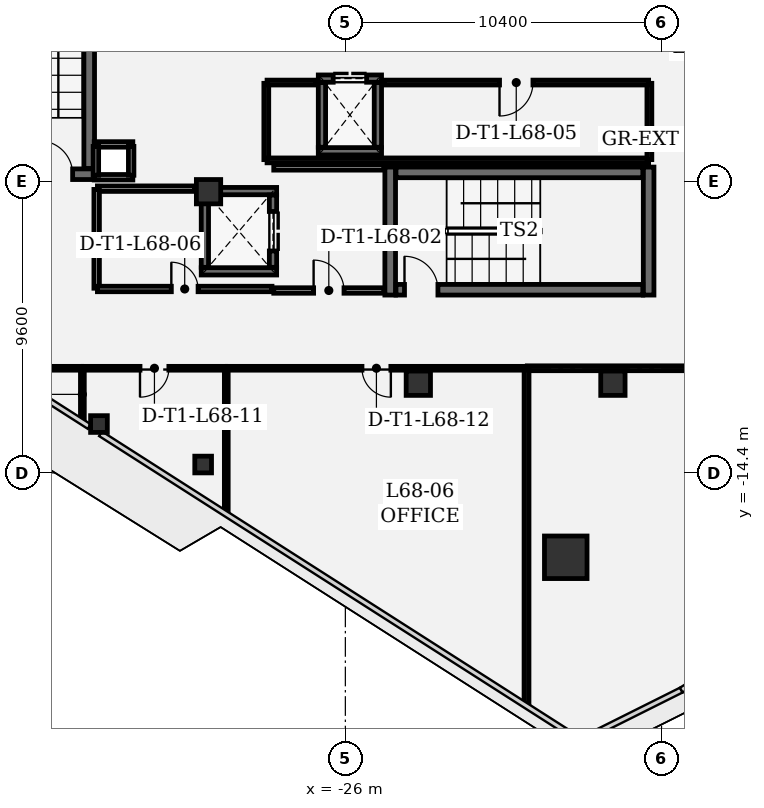
"""IFC4 building model, lengths in metres.
Left out: names, types, materials, properties, quantities, classifications, styles, units other than length and angle.
Written with IfcOpenShell. Run it as: python <this file> out.ifc"""

import sys

from ifc_helpers import new_model, si_unit, direction, frame, frame_2d, origin, origin_2d, place, context, subcontext, project, spatial, rectangle, extrude, element, fill, save


model = new_model("IFC4")
c1 = context("Model", 3, precision=1e-05, world=origin(), true_north=direction((0.0, 1.0)))
c2 = subcontext(c1, "Body", "Model", "MODEL_VIEW")
j1 = project(units=[si_unit("LENGTHUNIT", "METRE"), si_unit("PLANEANGLEUNIT", "RADIAN")], contexts=[c1])
p1 = place(None, origin())
s1 = spatial("IfcSite", under=j1, at=p1, CompositionType="ELEMENT")
p2 = place(p1, origin())
s2 = spatial("IfcBuilding", under=s1, at=p2, CompositionType="ELEMENT")
p3 = place(p2, frame((0.0, 0.0, 293.4)))
s3 = spatial("IfcBuildingStorey", under=s2, at=p3, CompositionType="ELEMENT", Elevation=293.4)
p4 = place(p3, frame((-18.75, -17.176, 0.0), z_axis=(0.0, 0.0, 1.0), x_axis=(1.0, 0.0, 0.0)))
e1 = element("IfcColumn", 1, at=p4, inside=s3, PredefinedType="COLUMN", context=c2, shape_type="SweptSolid", body=[
    extrude(rectangle(XDim=1.4, YDim=1.4, at=origin_2d()), origin(), (0.0, 0.0, 1.0), 4.2),
])
for number, where, z_axis, x_axis in (
    (2, (-17.2, -11.45, 0.0), (0.0, 0.0, 1.0), (1.0, 0.0, 0.0)),
    (3, (-23.6, -11.45, 0.0), (0.0, 0.0, 1.0), (1.0, 0.0, 0.0)),
    (4, (-30.5, -5.15, 0.0), (0.0, 0.0, 1.0), (1.0, 0.0, 0.0)),
):
    element("IfcColumn", number, at=place(p3, frame(where, z_axis=z_axis, x_axis=x_axis)), inside=s3, PredefinedType="COLUMN", context=c2, shape_type="SweptSolid", body=[
        extrude(rectangle(XDim=0.8, YDim=0.8, at=origin_2d()), origin(), (0.0, 0.0, 1.0), 4.2),
    ])
for number, where, z_axis, x_axis in (
    (5, (-34.104, -12.792, 0.0), (0.0, 0.0, 1.0), (1.0, 0.0, 0.0)),
    (6, (-30.677, -14.124, 0.0), (0.0, 0.0, 1.0), (1.0, 0.0, 0.0)),
):
    element("IfcColumn", number, at=place(p3, frame(where, z_axis=z_axis, x_axis=x_axis)), inside=s3, PredefinedType="COLUMN", context=c2, shape_type="SweptSolid", body=[
        extrude(rectangle(XDim=0.55, YDim=0.55, at=origin_2d()), origin(), (0.0, 0.0, 1.0), 4.2),
    ])
for number, where, z_axis, x_axis in (
    (7, (-24.525, -4.34, 0.0), (0.0, 0.0, 1.0), (0.0, -1.0, 0.0)),
    (8, (-16.025, -8.55, 0.0), (0.0, 0.0, 1.0), (0.0, 1.0, 0.0)),
):
    element("IfcWall", number, at=place(p3, frame(where, z_axis=z_axis, x_axis=x_axis)), inside=s3, PredefinedType="SHEAR", context=c2, shape_type="SweptSolid", body=[
        extrude(rectangle(XDim=4.21, YDim=0.35, at=frame_2d((2.105, 0.0))), origin(), (0.0, 0.0, 1.0), 3.91),
    ])
p5 = place(p3, frame((-24.335, -8.375, 0.0), z_axis=(0.0, 0.0, 1.0), x_axis=(1.0, 0.0, 0.0)))
e9 = element("IfcWall", 9, at=p5, inside=s3, PredefinedType="SHEAR", context=c2, shape_type="SweptSolid", body=[
    extrude(rectangle(XDim=8.12, YDim=0.35, at=frame_2d((4.06, 0.0))), origin(), (0.0, 0.0, 1.0), 3.91),
])
p6 = place(p5, frame((0.28, 0.0, 0.0)))
e10 = element("IfcOpeningElement", 10, at=p6, cuts=e9, PredefinedType="OPENING", context=c2, shape_type="SweptSolid", body=[
    extrude(rectangle(XDim=1.1, YDim=2.2, at=frame_2d((0.55, 1.1))), frame((0.0, 0.185, 0.0), z_axis=(0.0, -1.0, 0.0), x_axis=(1.0, 0.0, 0.0)), (0.0, 0.0, 1.0), 0.37),
])
p7 = place(p3, frame((-16.215, -4.515, 0.0), z_axis=(0.0, 0.0, 1.0), x_axis=(-1.0, 0.0, 0.0)))
e11 = element("IfcWall", 11, at=p7, inside=s3, PredefinedType="SHEAR", context=c2, shape_type="SweptSolid", body=[
    extrude(rectangle(XDim=8.12, YDim=0.35, at=frame_2d((4.06, 0.0))), origin(), (0.0, 0.0, 1.0), 3.91),
])
p8 = place(p3, frame((-38.46, -4.575, 0.0), z_axis=(0.0, 0.0, 1.0), x_axis=(1.0, 0.0, 0.0)))
e12 = element("IfcWall", 12, at=p8, inside=s3, PredefinedType="SHEAR", context=c2, shape_type="SweptSolid", body=[
    extrude(rectangle(XDim=4.21, YDim=0.35, at=frame_2d((2.105, 0.0))), origin(), (0.0, 0.0, 1.0), 3.91),
])
p9 = place(p8, frame((2.39, 0.0, 0.0)))
e13 = element("IfcOpeningElement", 13, at=p9, cuts=e12, PredefinedType="OPENING", context=c2, shape_type="SweptSolid", body=[
    extrude(rectangle(XDim=1.1, YDim=2.2, at=frame_2d((0.55, 1.1))), frame((0.0, 0.185, 0.0), z_axis=(0.0, -1.0, 0.0), x_axis=(1.0, 0.0, 0.0)), (0.0, 0.0, 1.0), 0.37),
])
p10 = place(p3, frame((-34.425, -4.385, 0.0), z_axis=(0.0, 0.0, 1.0), x_axis=(0.0, 1.0, 0.0)))
e14 = element("IfcWall", 14, at=p10, inside=s3, PredefinedType="SHEAR", context=c2, shape_type="SweptSolid", body=[
    extrude(rectangle(XDim=8.77, YDim=0.35, at=frame_2d((4.385, 0.0))), origin(), (0.0, 0.0, 1.0), 3.91),
])
for number, where, z_axis, x_axis in (
    (15, (-28.26, -7.77, 0.0), (0.0, 0.0, 1.0), (-1.0, 0.0, 0.0)),
    (16, (-30.74, -5.13, 0.0), (0.0, 0.0, 1.0), (1.0, 0.0, 0.0)),
):
    element("IfcWall", number, at=place(p3, frame(where, z_axis=z_axis, x_axis=x_axis)), inside=s3, PredefinedType="SHEAR", context=c2, shape_type="SweptSolid", body=[
        extrude(rectangle(XDim=2.48, YDim=0.24, at=frame_2d((1.24, 0.0))), origin(), (0.0, 0.0, 1.0), 3.91),
    ])
p11 = place(p3, frame((-30.62, -7.638, 0.0), z_axis=(0.0, 0.0, 1.0), x_axis=(0.0, 1.0, 0.0)))
e17 = element("IfcWall", 17, at=p11, inside=s3, PredefinedType="SHEAR", context=c2, shape_type="SweptSolid", body=[
    extrude(rectangle(XDim=2.376, YDim=0.24, at=frame_2d((1.188, 0.0))), origin(), (0.0, 0.0, 1.0), 3.91),
])
p12 = place(p3, frame((-28.38, -5.262, 0.0), z_axis=(0.0, 0.0, 1.0), x_axis=(0.0, -1.0, 0.0)))
e18 = element("IfcWall", 18, at=p12, inside=s3, PredefinedType="SHEAR", context=c2, shape_type="SweptSolid", body=[
    extrude(rectangle(XDim=2.376, YDim=0.24, at=frame_2d((1.188, 0.0))), origin(), (0.0, 0.0, 1.0), 3.91),
])
p13 = place(p12, frame((0.538, 0.0, 0.0)))
e19 = element("IfcOpeningElement", 19, at=p13, cuts=e18, PredefinedType="OPENING", context=c2, shape_type="SweptSolid", body=[
    extrude(rectangle(XDim=1.3, YDim=2.3, at=frame_2d((0.65, 1.15))), frame((0.0, 0.13, 0.0), z_axis=(0.0, -1.0, 0.0), x_axis=(1.0, 0.0, 0.0)), (0.0, 0.0, 1.0), 0.26),
])
p14 = place(p3, frame((-24.81, -3.82, 0.0), z_axis=(0.0, 0.0, 1.0), x_axis=(-1.0, 0.0, 0.0)))
e20 = element("IfcWall", 20, at=p14, inside=s3, PredefinedType="SHEAR", context=c2, shape_type="SweptSolid", body=[
    extrude(rectangle(XDim=2.08, YDim=0.24, at=frame_2d((1.04, 0.0))), origin(), (0.0, 0.0, 1.0), 3.91),
])
p15 = place(p3, frame((-26.89, -1.43, 0.0), z_axis=(0.0, 0.0, 1.0), x_axis=(1.0, 0.0, 0.0)))
e21 = element("IfcWall", 21, at=p15, inside=s3, PredefinedType="SHEAR", context=c2, shape_type="SweptSolid", body=[
    extrude(rectangle(XDim=2.08, YDim=0.24, at=frame_2d((1.04, 0.0))), origin(), (0.0, 0.0, 1.0), 3.91),
])
p16 = place(p15, frame((0.49, 0.0, 0.0)))
e22 = element("IfcOpeningElement", 22, at=p16, cuts=e21, PredefinedType="OPENING", context=c2, shape_type="SweptSolid", body=[
    extrude(rectangle(XDim=1.1, YDim=2.2, at=frame_2d((0.55, 1.1))), frame((0.0, 0.13, 0.0), z_axis=(0.0, -1.0, 0.0), x_axis=(1.0, 0.0, 0.0)), (0.0, 0.0, 1.0), 0.26),
])
for number, where, z_axis, x_axis in (
    (23, (-26.77, -3.688, 0.0), (0.0, 0.0, 1.0), (0.0, 1.0, 0.0)),
    (24, (-24.93, -1.562, 0.0), (0.0, 0.0, 1.0), (0.0, -1.0, 0.0)),
):
    element("IfcWall", number, at=place(p3, frame(where, z_axis=z_axis, x_axis=x_axis)), inside=s3, PredefinedType="SHEAR", context=c2, shape_type="SweptSolid", body=[
        extrude(rectangle(XDim=2.126, YDim=0.24, at=frame_2d((1.063, 0.0))), origin(), (0.0, 0.0, 1.0), 3.91),
    ])
for number, where, z_axis, x_axis in (
    (25, (-32.99, -4.675, 0.0), (0.0, 0.0, 1.0), (-1.0, 0.0, 0.0)),
    (26, (-34.26, -3.595, 0.0), (0.0, 0.0, 1.0), (1.0, 0.0, 0.0)),
):
    element("IfcWall", number, at=place(p3, frame(where, z_axis=z_axis, x_axis=x_axis)), inside=s3, PredefinedType="PARTITIONING", context=c2, shape_type="SweptSolid", body=[
        extrude(rectangle(XDim=1.27, YDim=0.18, at=frame_2d((0.635, 0.0))), origin(), (0.0, 0.0, 1.0), 3.91),
    ])
for number, where, z_axis, x_axis in (
    (27, (-34.205, -4.61, 0.0), (0.0, 0.0, 1.0), (0.0, 1.0, 0.0)),
    (28, (-33.045, -3.66, 0.0), (0.0, 0.0, 1.0), (0.0, -1.0, 0.0)),
):
    element("IfcWall", number, at=place(p3, frame(where, z_axis=z_axis, x_axis=x_axis)), inside=s3, PredefinedType="PARTITIONING", context=c2, shape_type="SweptSolid", body=[
        extrude(rectangle(XDim=0.95, YDim=0.18, at=frame_2d((0.475, 0.0))), origin(), (0.0, 0.0, 1.0), 3.91),
    ])
p17 = place(p3, frame((-28.355, -8.4, 0.0), z_axis=(0.0, 0.0, 1.0), x_axis=(1.0, 0.0, 0.0)))
e29 = element("IfcWall", 29, at=p17, inside=s3, PredefinedType="PARTITIONING", context=c2, shape_type="SweptSolid", body=[
    extrude(rectangle(XDim=3.622, YDim=0.18, at=frame_2d((1.811, 0.0))), origin(), (0.0, 0.0, 1.0), 3.529),
])
p18 = place(p17, frame((1.311, 0.0, 0.0)))
e30 = element("IfcOpeningElement", 30, at=p18, cuts=e29, PredefinedType="OPENING", context=c2, shape_type="SweptSolid", body=[
    extrude(rectangle(XDim=1.0, YDim=2.15, at=frame_2d((0.5, 1.075))), frame((0.0, 0.1, 0.0), z_axis=(0.0, -1.0, 0.0), x_axis=(1.0, 0.0, 0.0)), (0.0, 0.0, 1.0), 0.2),
])
p19 = place(p3, frame((-24.733, -4.35, 0.0), z_axis=(0.0, 0.0, 1.0), x_axis=(-1.0, 0.0, 0.0)))
e31 = element("IfcWall", 31, at=p19, inside=s3, PredefinedType="PARTITIONING", context=c2, shape_type="SweptSolid", body=[
    extrude(rectangle(XDim=3.622, YDim=0.18, at=frame_2d((1.811, 0.0))), origin(), (0.0, 0.0, 1.0), 3.91),
])
p20 = place(p3, frame((-28.6, -1.585, 0.0), z_axis=(0.0, 0.0, 1.0), x_axis=(0.0, -1.0, 0.0)))
e32 = element("IfcWall", 32, at=p20, inside=s3, PredefinedType="PARTITIONING", context=c2, shape_type="SweptSolid", body=[
    extrude(rectangle(XDim=2.51, YDim=0.16, at=frame_2d((1.255, 0.0))), origin(), (0.0, 0.0, 1.0), 3.91),
])
p21 = place(p3, frame((-28.575, -4.12, 0.0), z_axis=(0.0, 0.0, 1.0), x_axis=(1.0, 0.0, 0.0)))
e33 = element("IfcWall", 33, at=p21, inside=s3, PredefinedType="PARTITIONING", context=c2, shape_type="SweptSolid", body=[
    extrude(rectangle(XDim=12.55, YDim=0.16, at=frame_2d((6.275, 0.0))), origin(), (0.0, 0.0, 1.0), 3.91),
])
p22 = place(p3, frame((-16.0, -4.095, 0.0), z_axis=(0.0, 0.0, 1.0), x_axis=(0.0, 1.0, 0.0)))
e34 = element("IfcWall", 34, at=p22, inside=s3, PredefinedType="PARTITIONING", context=c2, shape_type="SweptSolid", body=[
    extrude(rectangle(XDim=2.51, YDim=0.16, at=frame_2d((1.255, 0.0))), origin(), (0.0, 0.0, 1.0), 3.91),
])
p23 = place(p3, frame((-16.025, -1.56, 0.0), z_axis=(0.0, 0.0, 1.0), x_axis=(-1.0, 0.0, 0.0)))
e35 = element("IfcWall", 35, at=p23, inside=s3, PredefinedType="PARTITIONING", context=c2, shape_type="SweptSolid", body=[
    extrude(rectangle(XDim=8.709, YDim=0.16, at=frame_2d((4.354, 0.0))), origin(), (0.0, 0.0, 1.0), 3.91),
])
p24 = place(p23, frame((3.804, 0.0, 0.0)))
e36 = element("IfcOpeningElement", 36, at=p24, cuts=e35, PredefinedType="OPENING", context=c2, shape_type="SweptSolid", body=[
    extrude(rectangle(XDim=1.1, YDim=2.15, at=frame_2d((0.55, 1.075))), frame((0.0, 0.09, 0.0), z_axis=(0.0, -1.0, 0.0), x_axis=(1.0, 0.0, 0.0)), (0.0, 0.0, 1.0), 0.18),
])
p25 = place(p3, frame((-26.966, -1.56, 0.0), z_axis=(0.0, 0.0, 1.0), x_axis=(-1.0, 0.0, 0.0)))
e37 = element("IfcWall", 37, at=p25, inside=s3, PredefinedType="PARTITIONING", context=c2, shape_type="SweptSolid", body=[
    extrude(rectangle(XDim=1.609, YDim=0.16, at=frame_2d((0.805, 0.0))), origin(), (0.0, 0.0, 1.0), 3.91),
])
p26 = place(p3, frame((-30.965, -5.05, 0.0), z_axis=(0.0, 0.0, 1.0), x_axis=(-1.0, 0.0, 0.0)))
e38 = element("IfcWall", 38, at=p26, inside=s3, PredefinedType="PARTITIONING", context=c2, shape_type="SweptSolid", body=[
    extrude(rectangle(XDim=3.19, YDim=0.18, at=frame_2d((1.595, 0.0))), origin(), (0.0, 0.0, 1.0), 3.91),
])
p27 = place(p3, frame((-34.18, -5.075, 0.0), z_axis=(0.0, 0.0, 1.0), x_axis=(0.0, -1.0, 0.0)))
e39 = element("IfcWall", 39, at=p27, inside=s3, PredefinedType="PARTITIONING", context=c2, shape_type="SweptSolid", body=[
    extrude(rectangle(XDim=3.25, YDim=0.18, at=frame_2d((1.625, 0.0))), origin(), (0.0, 0.0, 1.0), 3.91),
])
p28 = place(p3, frame((-34.155, -8.35, 0.0), z_axis=(0.0, 0.0, 1.0), x_axis=(1.0, 0.0, 0.0)))
e40 = element("IfcWall", 40, at=p28, inside=s3, PredefinedType="PARTITIONING", context=c2, shape_type="SweptSolid", body=[
    extrude(rectangle(XDim=5.742, YDim=0.18, at=frame_2d((2.871, 0.0))), origin(), (0.0, 0.0, 1.0), 3.13),
])
p29 = place(p28, frame((2.431, 0.0, 0.0)))
e41 = element("IfcOpeningElement", 41, at=p29, cuts=e40, PredefinedType="OPENING", context=c2, shape_type="SweptSolid", body=[
    extrude(rectangle(XDim=0.88, YDim=2.1, at=frame_2d((0.44, 1.05))), frame((0.0, 0.1, 0.0), z_axis=(0.0, -1.0, 0.0), x_axis=(1.0, 0.0, 0.0)), (0.0, 0.0, 1.0), 0.2),
])
p30 = place(p3, frame((-34.65, -12.65, 0.0), z_axis=(0.0, 0.0, 1.0), x_axis=(0.0, 1.0, 0.0)))
e42 = element("IfcWall", 42, at=p30, inside=s3, PredefinedType="PARTITIONING", context=c2, shape_type="SweptSolid", body=[
    extrude(rectangle(XDim=1.667, YDim=0.125, at=frame_2d((0.833, 0.0))), origin(), (0.0, 0.0, 1.0), 3.91),
])
p31 = place(p3, frame((-37.343, -10.958, 0.0), z_axis=(0.0, 0.0, 1.0), x_axis=(1.0, 0.0, 0.0)))
e43 = element("IfcWall", 43, at=p31, inside=s3, PredefinedType="PARTITIONING", context=c2, shape_type="SweptSolid", body=[
    extrude(rectangle(XDim=2.668, YDim=0.125, at=frame_2d((1.334, 0.0))), origin(), (0.0, 0.0, 1.0), 3.91),
])
p32 = place(p3, frame((-20.015, -10.958, 0.0), z_axis=(0.0, 0.0, 1.0), x_axis=(1.0, 0.0, 0.0)))
e44 = element("IfcWall", 44, at=p32, inside=s3, PredefinedType="PARTITIONING", context=c2, shape_type="SweptSolid", body=[
    extrude(rectangle(XDim=6.848, YDim=0.16, at=frame_2d((3.424, 0.0))), origin(), (0.0, 0.0, 1.0), 3.529),
])
p33 = place(p3, frame((-20.04, -10.983, 0.0), z_axis=(0.0, 0.0, 1.0), x_axis=(-0.00013312034, -0.999999991139, 0.0)))
e45 = element("IfcWall", 45, at=p33, inside=s3, PredefinedType="PARTITIONING", context=c2, shape_type="SweptSolid", body=[
    extrude(rectangle(XDim=11.004, YDim=0.16, at=frame_2d((5.502, 0.0))), origin(), (0.0, 0.0, 1.0), 3.91),
])
p34 = place(p3, frame((-29.917, -15.675, 0.0), z_axis=(0.0, 0.0, 1.0), x_axis=(0.0, 1.0, 0.0)))
e46 = element("IfcWall", 46, at=p34, inside=s3, PredefinedType="PARTITIONING", context=c2, shape_type="SweptSolid", body=[
    extrude(rectangle(XDim=4.692, YDim=0.125, at=frame_2d((2.346, 0.0))), origin(), (0.0, 0.0, 1.0), 3.91),
])
p35 = place(p3, frame((-29.942, -10.958, 0.0), z_axis=(0.0, 0.0, 1.0), x_axis=(-1.0, 0.0, 0.0)))
e47 = element("IfcWall", 47, at=p35, inside=s3, PredefinedType="PARTITIONING", context=c2, shape_type="SweptSolid", body=[
    extrude(rectangle(XDim=4.676, YDim=0.125, at=frame_2d((2.338, 0.0))), origin(), (0.0, 0.0, 1.0), 3.13),
])
p36 = place(p35, frame((1.863, 0.0, 0.0)))
e48 = element("IfcOpeningElement", 48, at=p36, cuts=e47, PredefinedType="OPENING", context=c2, shape_type="SweptSolid", body=[
    extrude(rectangle(XDim=0.95, YDim=2.15, at=frame_2d((0.475, 1.075))), frame((0.0, 0.073, 0.0), z_axis=(0.0, -1.0, 0.0), x_axis=(1.0, 0.0, 0.0)), (0.0, 0.0, 1.0), 0.145),
])
p37 = place(p3, frame((-20.073, -10.958, 0.0), z_axis=(0.0, 0.0, 1.0), x_axis=(-1.0, 0.0, 0.0)))
e49 = element("IfcWall", 49, at=p37, inside=s3, PredefinedType="PARTITIONING", context=c2, shape_type="SweptSolid", body=[
    extrude(rectangle(XDim=9.811, YDim=0.125, at=frame_2d((4.905, 0.0))), origin(), (0.0, 0.0, 1.0), 3.13),
])
p38 = place(p37, frame((4.43, 0.0, 0.0)))
e50 = element("IfcOpeningElement", 50, at=p38, cuts=e49, PredefinedType="OPENING", context=c2, shape_type="SweptSolid", body=[
    extrude(rectangle(XDim=0.95, YDim=2.15, at=frame_2d((0.475, 1.075))), frame((0.0, 0.073, 0.0), z_axis=(0.0, -1.0, 0.0), x_axis=(1.0, 0.0, 0.0)), (0.0, 0.0, 1.0), 0.145),
])
p39 = place(p6, origin())
e51 = element("IfcDoor", 51, at=p39, inside=s3, OperationType="SINGLE_SWING_LEFT", PredefinedType="DOOR", context=c2, shape_type="SweptSolid", body=[
    extrude(rectangle(XDim=1.1, YDim=2.2, at=frame_2d((0.55, 1.1))), frame((0.0, 0.025, 0.0), z_axis=(0.0, -1.0, 0.0), x_axis=(1.0, 0.0, 0.0)), (0.0, 0.0, 1.0), 0.05),
])
fill(e10, e51)
p40 = place(p9, origin())
e52 = element("IfcDoor", 52, at=p40, inside=s3, OperationType="SINGLE_SWING_LEFT", PredefinedType="DOOR", context=c2, shape_type="SweptSolid", body=[
    extrude(rectangle(XDim=1.1, YDim=2.2, at=frame_2d((0.55, 1.1))), frame((0.0, 0.025, 0.0), z_axis=(0.0, -1.0, 0.0), x_axis=(1.0, 0.0, 0.0)), (0.0, 0.0, 1.0), 0.05),
])
fill(e13, e52)
p41 = place(p13, origin())
e53 = element("IfcDoor", 53, at=p41, inside=s3, OperationType="DOUBLE_DOOR_SLIDING", PredefinedType="DOOR", context=c2, shape_type="SweptSolid", body=[
    extrude(rectangle(XDim=1.3, YDim=2.3, at=frame_2d((0.65, 1.15))), frame((0.0, 0.025, 0.0), z_axis=(0.0, -1.0, 0.0), x_axis=(1.0, 0.0, 0.0)), (0.0, 0.0, 1.0), 0.05),
])
fill(e19, e53)
p42 = place(p16, origin())
e54 = element("IfcDoor", 54, at=p42, inside=s3, OperationType="DOUBLE_DOOR_SLIDING", PredefinedType="DOOR", context=c2, shape_type="SweptSolid", body=[
    extrude(rectangle(XDim=1.1, YDim=2.2, at=frame_2d((0.55, 1.1))), frame((0.0, 0.025, 0.0), z_axis=(0.0, -1.0, 0.0), x_axis=(1.0, 0.0, 0.0)), (0.0, 0.0, 1.0), 0.05),
])
fill(e22, e54)
p43 = place(p18, origin())
e55 = element("IfcDoor", 55, at=p43, inside=s3, OperationType="SINGLE_SWING_LEFT", PredefinedType="DOOR", context=c2, shape_type="SweptSolid", body=[
    extrude(rectangle(XDim=1.0, YDim=2.15, at=frame_2d((0.5, 1.075))), frame((0.0, 0.025, 0.0), z_axis=(0.0, -1.0, 0.0), x_axis=(1.0, 0.0, 0.0)), (0.0, 0.0, 1.0), 0.05),
])
fill(e30, e55)
p44 = place(p24, origin())
e56 = element("IfcDoor", 56, at=p44, inside=s3, OperationType="SINGLE_SWING_RIGHT", PredefinedType="DOOR", context=c2, shape_type="SweptSolid", body=[
    extrude(rectangle(XDim=1.1, YDim=2.15, at=frame_2d((0.55, 1.075))), frame((0.0, 0.025, 0.0), z_axis=(0.0, -1.0, 0.0), x_axis=(1.0, 0.0, 0.0)), (0.0, 0.0, 1.0), 0.05),
])
fill(e36, e56)
p45 = place(p29, origin())
e57 = element("IfcDoor", 57, at=p45, inside=s3, OperationType="SINGLE_SWING_LEFT", PredefinedType="DOOR", context=c2, shape_type="SweptSolid", body=[
    extrude(rectangle(XDim=0.88, YDim=2.1, at=frame_2d((0.44, 1.05))), frame((0.0, 0.025, 0.0), z_axis=(0.0, -1.0, 0.0), x_axis=(1.0, 0.0, 0.0)), (0.0, 0.0, 1.0), 0.05),
])
fill(e41, e57)
p46 = place(p36, origin())
e58 = element("IfcDoor", 58, at=p46, inside=s3, OperationType="SINGLE_SWING_RIGHT", PredefinedType="DOOR", context=c2, shape_type="SweptSolid", body=[
    extrude(rectangle(XDim=0.95, YDim=2.15, at=frame_2d((0.475, 1.075))), frame((0.0, 0.025, 0.0), z_axis=(0.0, -1.0, 0.0), x_axis=(1.0, 0.0, 0.0)), (0.0, 0.0, 1.0), 0.05),
])
fill(e48, e58)
p47 = place(p38, origin())
e59 = element("IfcDoor", 59, at=p47, inside=s3, OperationType="SINGLE_SWING_LEFT", PredefinedType="DOOR", context=c2, shape_type="SweptSolid", body=[
    extrude(rectangle(XDim=0.95, YDim=2.15, at=frame_2d((0.475, 1.075))), frame((0.0, 0.025, 0.0), z_axis=(0.0, -1.0, 0.0), x_axis=(1.0, 0.0, 0.0)), (0.0, 0.0, 1.0), 0.05),
])
fill(e50, e59)
save(model, sys.argv[1])
